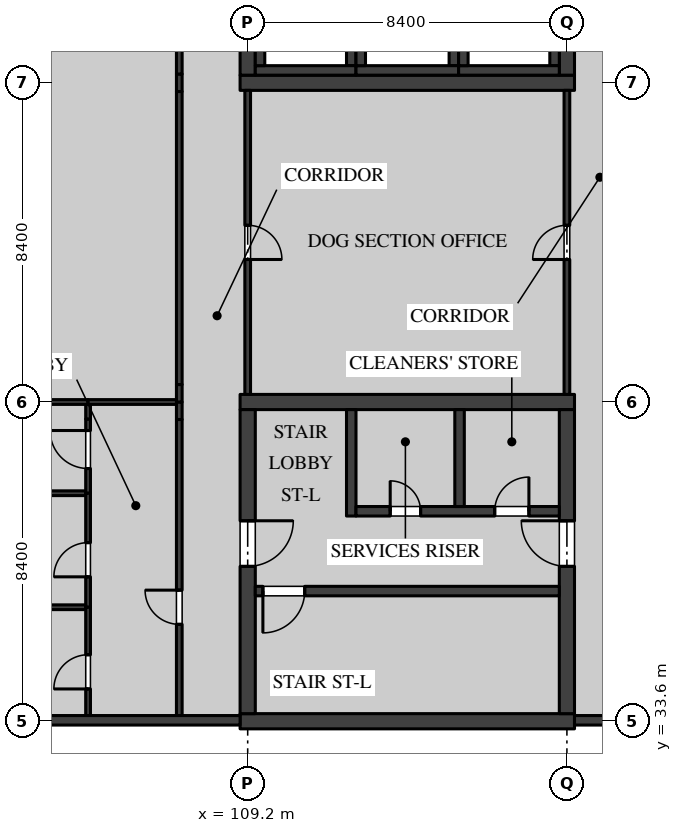
"""IFC4 building model, lengths in metres.
Left out: names, types, materials, properties, quantities, classifications, styles, units other than length and angle.
Written with IfcOpenShell. Run it as: python <this file> out.ifc"""

import sys

from ifc_helpers import new_model, si_unit, direction, frame, frame_2d, origin, place, context, subcontext, project, spatial, rectangle, extrude, element, fill, save


model = new_model("IFC4")
c1 = context("Model", 3, precision=1e-05, world=origin(), true_north=direction((0.0, 1.0)))
c2 = subcontext(c1, "Body", "Model", "MODEL_VIEW")
j1 = project(units=[si_unit("LENGTHUNIT", "METRE"), si_unit("PLANEANGLEUNIT", "RADIAN")], contexts=[c1])
p1 = place(None, origin())
s1 = spatial("IfcSite", under=j1, at=p1, CompositionType="ELEMENT")
p2 = place(p1, origin())
s2 = spatial("IfcBuilding", under=s1, at=p2, CompositionType="ELEMENT")
p3 = place(p2, frame((0.0, 0.0, 9.9)))
s3 = spatial("IfcBuildingStorey", under=s2, at=p3, CompositionType="ELEMENT", Elevation=9.9)
p4 = place(p3, frame((109.0, 50.4, 0.0), z_axis=(0.0, 0.0, 1.0), x_axis=(1.0, 0.0, 0.0)))
e1 = element("IfcWall", 1, at=p4, inside=s3, PredefinedType="SHEAR", context=c2, shape_type="SweptSolid", body=[
    extrude(rectangle(XDim=8.8, YDim=0.4, at=frame_2d((4.4, 0.0))), origin(), (0.0, 0.0, 1.0), 4.37),
])
p5 = place(p3, frame((109.2, 50.6, 0.0), z_axis=(0.0, 0.0, 1.0), x_axis=(0.0, 1.0, 0.0)))
e2 = element("IfcWall", 2, at=p5, inside=s3, PredefinedType="SHEAR", context=c2, shape_type="SweptSolid", body=[
    extrude(rectangle(XDim=8.0, YDim=0.4, at=frame_2d((4.0, 0.0))), origin(), (0.0, 0.0, 1.0), 4.37),
])
p6 = place(p5, frame((3.25, 0.0, 0.0)))
e3 = element("IfcOpeningElement", 3, at=p6, cuts=e2, PredefinedType="OPENING", context=c2, shape_type="SweptSolid", body=[
    extrude(rectangle(XDim=1.2, YDim=2.1, at=frame_2d((0.6, 1.05))), frame((0.0, 0.21, 0.0), z_axis=(0.0, -1.0, 0.0), x_axis=(1.0, 0.0, 0.0)), (0.0, 0.0, 1.0), 0.42),
])
p7 = place(p3, frame((117.6, 50.6, 0.0), z_axis=(0.0, 0.0, 1.0), x_axis=(0.0, 1.0, 0.0)))
e4 = element("IfcWall", 4, at=p7, inside=s3, PredefinedType="SHEAR", context=c2, shape_type="SweptSolid", body=[
    extrude(rectangle(XDim=8.0, YDim=0.4, at=frame_2d((4.0, 0.0))), origin(), (0.0, 0.0, 1.0), 4.37),
])
p8 = place(p7, frame((3.25, 0.0, 0.0)))
e5 = element("IfcOpeningElement", 5, at=p8, cuts=e4, PredefinedType="OPENING", context=c2, shape_type="SweptSolid", body=[
    extrude(rectangle(XDim=1.2, YDim=2.1, at=frame_2d((0.6, 1.05))), frame((0.0, 0.21, 0.0), z_axis=(0.0, -1.0, 0.0), x_axis=(1.0, 0.0, 0.0)), (0.0, 0.0, 1.0), 0.42),
])
p9 = place(p7, frame((6.0, 0.0, 0.0)))
e6 = element("IfcOpeningElement", 6, at=p9, cuts=e4, PredefinedType="OPENING", context=c2, shape_type="SweptSolid", body=[
    extrude(rectangle(XDim=1.2, YDim=2.1, at=frame_2d((0.6, 1.05))), frame((0.0, 0.21, 0.0), z_axis=(0.0, -1.0, 0.0), x_axis=(1.0, 0.0, 0.0)), (0.0, 0.0, 1.0), 0.42),
])
for number, where, z_axis, x_axis in (
    (7, (109.0, 33.6, 0.0), (0.0, 0.0, 1.0), (1.0, 0.0, 0.0)),
    (8, (109.0, 42.0, 0.0), (0.0, 0.0, 1.0), (1.0, 0.0, 0.0)),
):
    element("IfcWall", number, at=place(p3, frame(where, z_axis=z_axis, x_axis=x_axis)), inside=s3, PredefinedType="SHEAR", context=c2, shape_type="SweptSolid", body=[
        extrude(rectangle(XDim=8.8, YDim=0.4, at=frame_2d((4.4, 0.0))), origin(), (0.0, 0.0, 1.0), 4.37),
    ])
p10 = place(p3, frame((109.2, 33.8, 0.0), z_axis=(0.0, 0.0, 1.0), x_axis=(0.0, 1.0, 0.0)))
e9 = element("IfcWall", 9, at=p10, inside=s3, PredefinedType="SHEAR", context=c2, shape_type="SweptSolid", body=[
    extrude(rectangle(XDim=8.0, YDim=0.4, at=frame_2d((4.0, 0.0))), origin(), (0.0, 0.0, 1.0), 4.37),
])
p11 = place(p10, frame((3.875, 0.0, 0.0)))
e10 = element("IfcOpeningElement", 10, at=p11, cuts=e9, PredefinedType="OPENING", context=c2, shape_type="SweptSolid", body=[
    extrude(rectangle(XDim=1.2, YDim=2.1, at=frame_2d((0.6, 1.05))), frame((0.0, 0.21, 0.0), z_axis=(0.0, -1.0, 0.0), x_axis=(1.0, 0.0, 0.0)), (0.0, 0.0, 1.0), 0.42),
])
p12 = place(p3, frame((117.6, 33.8, 0.0), z_axis=(0.0, 0.0, 1.0), x_axis=(0.0, 1.0, 0.0)))
e11 = element("IfcWall", 11, at=p12, inside=s3, PredefinedType="SHEAR", context=c2, shape_type="SweptSolid", body=[
    extrude(rectangle(XDim=8.0, YDim=0.4, at=frame_2d((4.0, 0.0))), origin(), (0.0, 0.0, 1.0), 4.37),
])
p13 = place(p12, frame((3.875, 0.0, 0.0)))
e12 = element("IfcOpeningElement", 12, at=p13, cuts=e11, PredefinedType="OPENING", context=c2, shape_type="SweptSolid", body=[
    extrude(rectangle(XDim=1.2, YDim=2.1, at=frame_2d((0.6, 1.05))), frame((0.0, 0.21, 0.0), z_axis=(0.0, -1.0, 0.0), x_axis=(1.0, 0.0, 0.0)), (0.0, 0.0, 1.0), 0.42),
])
p14 = place(p3, frame((109.4, 37.025, 0.0), z_axis=(0.0, 0.0, 1.0), x_axis=(1.0, 0.0, 0.0)))
e13 = element("IfcWall", 13, at=p14, inside=s3, PredefinedType="SOLIDWALL", context=c2, shape_type="SweptSolid", body=[
    extrude(rectangle(XDim=8.0, YDim=0.25, at=frame_2d((4.0, 0.0))), origin(), (0.0, 0.0, 1.0), 4.37),
])
p15 = place(p14, frame((0.2, 0.0, 0.0)))
e14 = element("IfcOpeningElement", 14, at=p15, cuts=e13, PredefinedType="OPENING", context=c2, shape_type="SweptSolid", body=[
    extrude(rectangle(XDim=1.1, YDim=2.1, at=frame_2d((0.55, 1.05))), frame((0.0, 0.135, 0.0), z_axis=(0.0, -1.0, 0.0), x_axis=(1.0, 0.0, 0.0)), (0.0, 0.0, 1.0), 0.27),
])
p16 = place(p3, frame((111.925, 39.0, 0.0), z_axis=(0.0, 0.0, 1.0), x_axis=(0.0, 1.0, 0.0)))
e15 = element("IfcWall", 15, at=p16, inside=s3, PredefinedType="SOLIDWALL", context=c2, shape_type="SweptSolid", body=[
    extrude(rectangle(XDim=2.8, YDim=0.25, at=frame_2d((1.4, 0.0))), origin(), (0.0, 0.0, 1.0), 4.37),
])
p17 = place(p3, frame((112.05, 39.125, 0.0), z_axis=(0.0, 0.0, 1.0), x_axis=(1.0, 0.0, 0.0)))
e16 = element("IfcWall", 16, at=p17, inside=s3, PredefinedType="SOLIDWALL", context=c2, shape_type="SweptSolid", body=[
    extrude(rectangle(XDim=5.35, YDim=0.25, at=frame_2d((2.675, 0.0))), origin(), (0.0, 0.0, 1.0), 4.37),
])
p18 = place(p17, frame((3.65, 0.0, 0.0)))
e17 = element("IfcOpeningElement", 17, at=p18, cuts=e16, PredefinedType="OPENING", context=c2, shape_type="SweptSolid", body=[
    extrude(rectangle(XDim=0.9, YDim=2.1, at=frame_2d((0.45, 1.05))), frame((0.0, 0.135, 0.0), z_axis=(0.0, -1.0, 0.0), x_axis=(1.0, 0.0, 0.0)), (0.0, 0.0, 1.0), 0.27),
])
p19 = place(p17, frame((0.9, 0.0, 0.0)))
e18 = element("IfcOpeningElement", 18, at=p19, cuts=e16, PredefinedType="OPENING", context=c2, shape_type="SweptSolid", body=[
    extrude(rectangle(XDim=0.8, YDim=2.1, at=frame_2d((0.4, 1.05))), frame((0.0, 0.135, 0.0), z_axis=(0.0, -1.0, 0.0), x_axis=(1.0, 0.0, 0.0)), (0.0, 0.0, 1.0), 0.27),
])
p20 = place(p3, frame((114.775, 39.25, 0.0), z_axis=(0.0, 0.0, 1.0), x_axis=(0.0, 1.0, 0.0)))
e19 = element("IfcWall", 19, at=p20, inside=s3, PredefinedType="SOLIDWALL", context=c2, shape_type="SweptSolid", body=[
    extrude(rectangle(XDim=2.55, YDim=0.25, at=frame_2d((1.275, 0.0))), origin(), (0.0, 0.0, 1.0), 4.37),
])
p21 = place(p3, frame((111.925, 50.85, 0.0), z_axis=(0.0, 0.0, 1.0), x_axis=(0.0, 1.0, 0.0)))
e20 = element("IfcWall", 20, at=p21, inside=s3, PredefinedType="SOLIDWALL", context=c2, shape_type="SweptSolid", body=[
    extrude(rectangle(XDim=2.3, YDim=0.25, at=frame_2d((1.15, 0.0))), origin(), (0.0, 0.0, 1.0), 4.37),
])
p22 = place(p3, frame((109.4, 50.725, 0.0), z_axis=(0.0, 0.0, 1.0), x_axis=(1.0, 0.0, 0.0)))
e21 = element("IfcWall", 21, at=p22, inside=s3, PredefinedType="SOLIDWALL", context=c2, shape_type="SweptSolid", body=[
    extrude(rectangle(XDim=2.65, YDim=0.25, at=frame_2d((1.325, 0.0))), origin(), (0.0, 0.0, 1.0), 4.37),
])
for number, where, z_axis, x_axis in (
    (22, (109.525, 50.85, 0.0), (0.0, 0.0, 1.0), (0.0, 1.0, 0.0)),
    (23, (114.625, 50.85, 0.0), (0.0, 0.0, 1.0), (0.0, 1.0, 0.0)),
):
    element("IfcWall", number, at=place(p3, frame(where, z_axis=z_axis, x_axis=x_axis)), inside=s3, PredefinedType="SOLIDWALL", context=c2, shape_type="SweptSolid", body=[
        extrude(rectangle(XDim=2.3, YDim=0.25, at=frame_2d((1.15, 0.0))), origin(), (0.0, 0.0, 1.0), 4.37),
    ])
p23 = place(p3, frame((112.05, 50.725, 0.0), z_axis=(0.0, 0.0, 1.0), x_axis=(1.0, 0.0, 0.0)))
e24 = element("IfcWall", 24, at=p23, inside=s3, PredefinedType="SOLIDWALL", context=c2, shape_type="SweptSolid", body=[
    extrude(rectangle(XDim=2.7, YDim=0.25, at=frame_2d((1.35, 0.0))), origin(), (0.0, 0.0, 1.0), 4.37),
])
for number, where, z_axis, x_axis in (
    (25, (112.175, 50.85, 0.0), (0.0, 0.0, 1.0), (0.0, 1.0, 0.0)),
    (26, (117.275, 50.85, 0.0), (0.0, 0.0, 1.0), (0.0, 1.0, 0.0)),
):
    element("IfcWall", number, at=place(p3, frame(where, z_axis=z_axis, x_axis=x_axis)), inside=s3, PredefinedType="SOLIDWALL", context=c2, shape_type="SweptSolid", body=[
        extrude(rectangle(XDim=2.3, YDim=0.25, at=frame_2d((1.15, 0.0))), origin(), (0.0, 0.0, 1.0), 4.37),
    ])
p24 = place(p3, frame((114.75, 50.725, 0.0), z_axis=(0.0, 0.0, 1.0), x_axis=(1.0, 0.0, 0.0)))
e27 = element("IfcWall", 27, at=p24, inside=s3, PredefinedType="SOLIDWALL", context=c2, shape_type="SweptSolid", body=[
    extrude(rectangle(XDim=2.65, YDim=0.25, at=frame_2d((1.325, 0.0))), origin(), (0.0, 0.0, 1.0), 4.37),
])
p25 = place(p3, frame((114.875, 50.85, 0.0), z_axis=(0.0, 0.0, 1.0), x_axis=(0.0, 1.0, 0.0)))
e28 = element("IfcWall", 28, at=p25, inside=s3, PredefinedType="SOLIDWALL", context=c2, shape_type="SweptSolid", body=[
    extrude(rectangle(XDim=2.3, YDim=0.25, at=frame_2d((1.15, 0.0))), origin(), (0.0, 0.0, 1.0), 4.37),
])
p26 = place(p3, frame((117.6, 42.2, 0.0), z_axis=(0.0, 0.0, 1.0), x_axis=(0.0, 1.0, 0.0)))
e29 = element("IfcWall", 29, at=p26, inside=s3, PredefinedType="PARTITIONING", context=c2, shape_type="SweptSolid", body=[
    extrude(rectangle(XDim=8.0, YDim=0.15, at=frame_2d((4.0, 0.0))), origin(), (0.0, 0.0, 1.0), 3.746),
])
p27 = place(p26, frame((3.55, 0.0, 0.0)))
e30 = element("IfcOpeningElement", 30, at=p27, cuts=e29, PredefinedType="OPENING", context=c2, shape_type="SweptSolid", body=[
    extrude(rectangle(XDim=0.9, YDim=2.1, at=frame_2d((0.45, 1.05))), frame((0.0, 0.085, 0.0), z_axis=(0.0, -1.0, 0.0), x_axis=(1.0, 0.0, 0.0)), (0.0, 0.0, 1.0), 0.17),
])
p28 = place(p3, frame((109.2, 42.2, 0.0), z_axis=(0.0, 0.0, 1.0), x_axis=(0.0, 1.0, 0.0)))
e31 = element("IfcWall", 31, at=p28, inside=s3, PredefinedType="PARTITIONING", context=c2, shape_type="SweptSolid", body=[
    extrude(rectangle(XDim=8.0, YDim=0.15, at=frame_2d((4.0, 0.0))), origin(), (0.0, 0.0, 1.0), 3.746),
])
p29 = place(p28, frame((3.55, 0.0, 0.0)))
e32 = element("IfcOpeningElement", 32, at=p29, cuts=e31, PredefinedType="OPENING", context=c2, shape_type="SweptSolid", body=[
    extrude(rectangle(XDim=0.9, YDim=2.1, at=frame_2d((0.45, 1.05))), frame((0.0, 0.085, 0.0), z_axis=(0.0, -1.0, 0.0), x_axis=(1.0, 0.0, 0.0)), (0.0, 0.0, 1.0), 0.17),
])
p30 = place(p3, frame((107.4, 33.75, 0.0), z_axis=(0.0, 0.0, 1.0), x_axis=(0.0, 1.0, 0.0)))
e33 = element("IfcWall", 33, at=p30, inside=s3, PredefinedType="PARTITIONING", context=c2, shape_type="SweptSolid", body=[
    extrude(rectangle(XDim=7.79, YDim=0.15, at=frame_2d((3.895, 0.0))), origin(), (0.0, 0.0, 1.0), 4.37),
])
p31 = place(p30, frame((2.4, 0.0, 0.0)))
e34 = element("IfcOpeningElement", 34, at=p31, cuts=e33, PredefinedType="OPENING", context=c2, shape_type="SweptSolid", body=[
    extrude(rectangle(XDim=0.9, YDim=2.1, at=frame_2d((0.45, 1.05))), frame((0.0, 0.085, 0.0), z_axis=(0.0, -1.0, 0.0), x_axis=(1.0, 0.0, 0.0)), (0.0, 0.0, 1.0), 0.17),
])
for number, where, z_axis, x_axis in (
    (35, (107.4, 41.54, 0.0), (0.0, 0.0, 1.0), (0.0, 1.0, 0.0)),
    (36, (107.4, 42.0, 0.0), (0.0, 0.0, 1.0), (0.0, 1.0, 0.0)),
):
    element("IfcWall", number, at=place(p3, frame(where, z_axis=z_axis, x_axis=x_axis)), inside=s3, PredefinedType="PARTITIONING", context=c2, shape_type="SweptSolid", body=[
        extrude(rectangle(XDim=0.46, YDim=0.15, at=frame_2d((0.23, 0.0))), origin(), (0.0, 0.0, 1.0), 3.746),
    ])
p32 = place(p3, frame((107.4, 42.46, 0.0), z_axis=(0.0, 0.0, 1.0), x_axis=(0.0, 1.0, 0.0)))
e37 = element("IfcWall", 37, at=p32, inside=s3, PredefinedType="PARTITIONING", context=c2, shape_type="SweptSolid", body=[
    extrude(rectangle(XDim=7.71, YDim=0.15, at=frame_2d((3.855, 0.0))), origin(), (0.0, 0.0, 1.0), 4.37),
])
p33 = place(p3, frame((107.4, 50.17, 0.0), z_axis=(0.0, 0.0, 1.0), x_axis=(0.0, 1.0, 0.0)))
e38 = element("IfcWall", 38, at=p33, inside=s3, PredefinedType="PARTITIONING", context=c2, shape_type="SweptSolid", body=[
    extrude(rectangle(XDim=0.46, YDim=0.15, at=frame_2d((0.23, 0.0))), origin(), (0.0, 0.0, 1.0), 3.746),
])
p34 = place(p3, frame((107.4, 50.63, 0.0), z_axis=(0.0, 0.0, 1.0), x_axis=(0.0, 1.0, 0.0)))
e39 = element("IfcWall", 39, at=p34, inside=s3, PredefinedType="PARTITIONING", context=c2, shape_type="SweptSolid", body=[
    extrude(rectangle(XDim=7.94, YDim=0.15, at=frame_2d((3.97, 0.0))), origin(), (0.0, 0.0, 1.0), 4.37),
])
p35 = place(p34, frame((3.02, 0.0, 0.0)))
e40 = element("IfcOpeningElement", 40, at=p35, cuts=e39, PredefinedType="OPENING", context=c2, shape_type="SweptSolid", body=[
    extrude(rectangle(XDim=1.35, YDim=2.1, at=frame_2d((0.675, 1.05))), frame((0.0, 0.085, 0.0), z_axis=(0.0, -1.0, 0.0), x_axis=(1.0, 0.0, 0.0)), (0.0, 0.0, 1.0), 0.17),
])
p36 = place(p3, frame((103.407, 39.6, 0.0), z_axis=(0.0, 0.0, 1.0), x_axis=(1.0, 0.0, 0.0)))
e41 = element("IfcWall", 41, at=p36, inside=s3, PredefinedType="PARTITIONING", context=c2, shape_type="SweptSolid", body=[
    extrude(rectangle(XDim=1.531, YDim=0.125, at=frame_2d((0.766, 0.0))), origin(), (0.0, 0.0, 1.0), 3.895),
])
p37 = place(p3, frame((105.0, 39.6, 0.0), z_axis=(0.0, 0.0, 1.0), x_axis=(0.0, 1.0, 0.0)))
e42 = element("IfcWall", 42, at=p37, inside=s3, PredefinedType="PARTITIONING", context=c2, shape_type="SweptSolid", body=[
    extrude(rectangle(XDim=1.953, YDim=0.125, at=frame_2d((0.977, 0.0))), origin(), (0.0, 0.0, 1.0), 4.37),
])
p38 = place(p37, frame((0.65, 0.0, 0.0)))
e43 = element("IfcOpeningElement", 43, at=p38, cuts=e42, PredefinedType="OPENING", context=c2, shape_type="SweptSolid", body=[
    extrude(rectangle(XDim=1.0, YDim=2.1, at=frame_2d((0.5, 1.05))), frame((0.0, 0.073, 0.0), z_axis=(0.0, -1.0, 0.0), x_axis=(1.0, 0.0, 0.0)), (0.0, 0.0, 1.0), 0.145),
])
p39 = place(p3, frame((105.0, 41.553, 0.0), z_axis=(0.0, 0.0, 1.0), x_axis=(0.0, 1.0, 0.0)))
e44 = element("IfcWall", 44, at=p39, inside=s3, PredefinedType="PARTITIONING", context=c2, shape_type="SweptSolid", body=[
    extrude(rectangle(XDim=0.385, YDim=0.125, at=frame_2d((0.192, 0.0))), origin(), (0.0, 0.0, 1.0), 3.746),
])
p40 = place(p3, frame((100.999, 42.0, 0.0), z_axis=(0.0, 0.0, 1.0), x_axis=(1.0, 0.0, 0.0)))
e45 = element("IfcWall", 45, at=p40, inside=s3, PredefinedType="PARTITIONING", context=c2, shape_type="SweptSolid", body=[
    extrude(rectangle(XDim=4.001, YDim=0.125, at=frame_2d((2.0, 0.0))), origin(), (0.0, 0.0, 1.0), 3.746),
])
p41 = place(p3, frame((105.0, 36.6, 0.0), z_axis=(0.0, 0.0, 1.0), x_axis=(0.0, 1.0, 0.0)))
e46 = element("IfcWall", 46, at=p41, inside=s3, PredefinedType="PARTITIONING", context=c2, shape_type="SweptSolid", body=[
    extrude(rectangle(XDim=3.0, YDim=0.125, at=frame_2d((1.5, 0.0))), origin(), (0.0, 0.0, 1.0), 4.37),
])
p42 = place(p41, frame((0.8, 0.0, 0.0)))
e47 = element("IfcOpeningElement", 47, at=p42, cuts=e46, PredefinedType="OPENING", context=c2, shape_type="SweptSolid", body=[
    extrude(rectangle(XDim=0.9, YDim=2.1, at=frame_2d((0.45, 1.05))), frame((0.0, 0.073, 0.0), z_axis=(0.0, -1.0, 0.0), x_axis=(1.0, 0.0, 0.0)), (0.0, 0.0, 1.0), 0.145),
])
p43 = place(p3, frame((103.407, 36.6, 0.0), z_axis=(0.0, 0.0, 1.0), x_axis=(1.0, 0.0, 0.0)))
e48 = element("IfcWall", 48, at=p43, inside=s3, PredefinedType="PARTITIONING", context=c2, shape_type="SweptSolid", body=[
    extrude(rectangle(XDim=1.531, YDim=0.125, at=frame_2d((0.766, 0.0))), origin(), (0.0, 0.0, 1.0), 3.895),
])
p44 = place(p3, frame((105.0, 33.75, 0.0), z_axis=(0.0, 0.0, 1.0), x_axis=(0.0, 1.0, 0.0)))
e49 = element("IfcWall", 49, at=p44, inside=s3, PredefinedType="PARTITIONING", context=c2, shape_type="SweptSolid", body=[
    extrude(rectangle(XDim=2.85, YDim=0.125, at=frame_2d((1.425, 0.0))), origin(), (0.0, 0.0, 1.0), 4.37),
])
p45 = place(p44, frame((0.7, 0.0, 0.0)))
e50 = element("IfcOpeningElement", 50, at=p45, cuts=e49, PredefinedType="OPENING", context=c2, shape_type="SweptSolid", body=[
    extrude(rectangle(XDim=0.9, YDim=2.1, at=frame_2d((0.45, 1.05))), frame((0.0, 0.073, 0.0), z_axis=(0.0, -1.0, 0.0), x_axis=(1.0, 0.0, 0.0)), (0.0, 0.0, 1.0), 0.145),
])
p46 = place(p3, frame((105.0, 42.0, 0.0), z_axis=(0.0, 0.0, 1.0), x_axis=(1.0, 0.0, 0.0)))
e51 = element("IfcWall", 51, at=p46, inside=s3, PredefinedType="PARTITIONING", context=c2, shape_type="SweptSolid", body=[
    extrude(rectangle(XDim=2.325, YDim=0.125, at=frame_2d((1.163, 0.0))), origin(), (0.0, 0.0, 1.0), 3.746),
])
p47 = place(p3, frame((100.802, 33.625, 0.0), z_axis=(0.0, 0.0, 1.0), x_axis=(1.0, 0.0, 0.0)))
e52 = element("IfcWall", 52, at=p47, inside=s3, PredefinedType="SOLIDWALL", context=c2, shape_type="SweptSolid", body=[
    extrude(rectangle(XDim=8.198, YDim=0.25, at=frame_2d((4.099, 0.0))), origin(), (0.0, 0.0, 1.0), 3.746),
])
p48 = place(p47, frame((1.649, 0.0, 1.5)))
e53 = element("IfcOpeningElement", 53, at=p48, cuts=e52, PredefinedType="OPENING", context=c2, shape_type="SweptSolid", body=[
    extrude(rectangle(XDim=0.9, YDim=1.2, at=frame_2d((0.45, 0.6))), frame((0.0, 0.135, 0.0), z_axis=(0.0, -1.0, 0.0), x_axis=(1.0, 0.0, 0.0)), (0.0, 0.0, 1.0), 0.27),
])
p49 = place(p3, frame((117.8, 33.625, 0.0), z_axis=(0.0, 0.0, 1.0), x_axis=(1.0, 0.0, 0.0)))
e54 = element("IfcWall", 54, at=p49, inside=s3, PredefinedType="SOLIDWALL", context=c2, shape_type="SweptSolid", body=[
    extrude(rectangle(XDim=8.194, YDim=0.25, at=frame_2d((4.097, 0.0))), origin(), (0.0, 0.0, 1.0), 3.746),
])
p50 = place(p49, frame((5.2, 0.0, 0.9)))
e55 = element("IfcOpeningElement", 55, at=p50, cuts=e54, PredefinedType="OPENING", context=c2, shape_type="SweptSolid", body=[
    extrude(rectangle(XDim=1.8, YDim=2.1, at=frame_2d((0.9, 1.05))), frame((0.0, 0.135, 0.0), z_axis=(0.0, -1.0, 0.0), x_axis=(1.0, 0.0, 0.0)), (0.0, 0.0, 1.0), 0.27),
])
p51 = place(p18, origin())
e56 = element("IfcDoor", 56, at=p51, inside=s3, OperationType="SINGLE_SWING_LEFT", PredefinedType="DOOR", context=c2, shape_type="SweptSolid", body=[
    extrude(rectangle(XDim=0.9, YDim=2.1, at=frame_2d((0.45, 1.05))), frame((0.0, 0.035, 0.0), z_axis=(0.0, -1.0, 0.0), x_axis=(1.0, 0.0, 0.0)), (0.0, 0.0, 1.0), 0.07),
])
fill(e17, e56)
p52 = place(p11, frame((1.2, 0.0, 0.0), z_axis=(0.0, 0.0, 1.0), x_axis=(-1.0, 0.0, 0.0)))
e57 = element("IfcDoor", 57, at=p52, inside=s3, OperationType="SINGLE_SWING_RIGHT", PredefinedType="DOOR", context=c2, shape_type="SweptSolid", body=[
    extrude(rectangle(XDim=1.2, YDim=2.1, at=frame_2d((0.6, 1.05))), frame((0.0, 0.035, 0.0), z_axis=(0.0, -1.0, 0.0), x_axis=(1.0, 0.0, 0.0)), (0.0, 0.0, 1.0), 0.07),
])
fill(e10, e57)
p53 = place(p13, origin())
e58 = element("IfcDoor", 58, at=p53, inside=s3, OperationType="SINGLE_SWING_LEFT", PredefinedType="DOOR", context=c2, shape_type="SweptSolid", body=[
    extrude(rectangle(XDim=1.2, YDim=2.1, at=frame_2d((0.6, 1.05))), frame((0.0, 0.035, 0.0), z_axis=(0.0, -1.0, 0.0), x_axis=(1.0, 0.0, 0.0)), (0.0, 0.0, 1.0), 0.07),
])
fill(e12, e58)
p54 = place(p19, origin())
e59 = element("IfcDoor", 59, at=p54, inside=s3, OperationType="SINGLE_SWING_RIGHT", PredefinedType="DOOR", context=c2, shape_type="SweptSolid", body=[
    extrude(rectangle(XDim=0.8, YDim=2.1, at=frame_2d((0.4, 1.05))), frame((0.0, 0.035, 0.0), z_axis=(0.0, -1.0, 0.0), x_axis=(1.0, 0.0, 0.0)), (0.0, 0.0, 1.0), 0.07),
])
fill(e18, e59)
p55 = place(p15, frame((1.1, 0.0, 0.0), z_axis=(0.0, 0.0, 1.0), x_axis=(-1.0, 0.0, 0.0)))
e60 = element("IfcDoor", 60, at=p55, inside=s3, OperationType="SINGLE_SWING_LEFT", PredefinedType="DOOR", context=c2, shape_type="SweptSolid", body=[
    extrude(rectangle(XDim=1.1, YDim=2.1, at=frame_2d((0.55, 1.05))), frame((0.0, 0.035, 0.0), z_axis=(0.0, -1.0, 0.0), x_axis=(1.0, 0.0, 0.0)), (0.0, 0.0, 1.0), 0.07),
])
fill(e14, e60)
p56 = place(p27, origin())
e61 = element("IfcDoor", 61, at=p56, inside=s3, OperationType="SINGLE_SWING_RIGHT", PredefinedType="DOOR", context=c2, shape_type="SweptSolid", body=[
    extrude(rectangle(XDim=0.9, YDim=2.1, at=frame_2d((0.45, 1.05))), frame((0.0, 0.025, 0.0), z_axis=(0.0, -1.0, 0.0), x_axis=(1.0, 0.0, 0.0)), (0.0, 0.0, 1.0), 0.05),
])
fill(e30, e61)
p57 = place(p29, frame((0.9, 0.0, 0.0), z_axis=(0.0, 0.0, 1.0), x_axis=(-1.0, 0.0, 0.0)))
e62 = element("IfcDoor", 62, at=p57, inside=s3, OperationType="SINGLE_SWING_LEFT", PredefinedType="DOOR", context=c2, shape_type="SweptSolid", body=[
    extrude(rectangle(XDim=0.9, YDim=2.1, at=frame_2d((0.45, 1.05))), frame((0.0, 0.025, 0.0), z_axis=(0.0, -1.0, 0.0), x_axis=(1.0, 0.0, 0.0)), (0.0, 0.0, 1.0), 0.05),
])
fill(e32, e62)
p58 = place(p38, origin())
e63 = element("IfcDoor", 63, at=p58, inside=s3, OperationType="SINGLE_SWING_LEFT", PredefinedType="DOOR", context=c2, shape_type="SweptSolid", body=[
    extrude(rectangle(XDim=1.0, YDim=2.1, at=frame_2d((0.5, 1.05))), frame((0.0, 0.02, 0.0), z_axis=(0.0, -1.0, 0.0), x_axis=(1.0, 0.0, 0.0)), (0.0, 0.0, 1.0), 0.04),
])
fill(e43, e63)
p59 = place(p42, origin())
e64 = element("IfcDoor", 64, at=p59, inside=s3, OperationType="SINGLE_SWING_RIGHT", PredefinedType="DOOR", context=c2, shape_type="SweptSolid", body=[
    extrude(rectangle(XDim=0.9, YDim=2.1, at=frame_2d((0.45, 1.05))), frame((0.0, 0.02, 0.0), z_axis=(0.0, -1.0, 0.0), x_axis=(1.0, 0.0, 0.0)), (0.0, 0.0, 1.0), 0.04),
])
fill(e47, e64)
p60 = place(p31, origin())
e65 = element("IfcDoor", 65, at=p60, inside=s3, OperationType="SINGLE_SWING_LEFT", PredefinedType="DOOR", context=c2, shape_type="SweptSolid", body=[
    extrude(rectangle(XDim=0.9, YDim=2.1, at=frame_2d((0.45, 1.05))), frame((0.0, 0.025, 0.0), z_axis=(0.0, -1.0, 0.0), x_axis=(1.0, 0.0, 0.0)), (0.0, 0.0, 1.0), 0.05),
])
fill(e34, e65)
p61 = place(p45, origin())
e66 = element("IfcDoor", 66, at=p61, inside=s3, OperationType="SINGLE_SWING_RIGHT", PredefinedType="DOOR", context=c2, shape_type="SweptSolid", body=[
    extrude(rectangle(XDim=0.9, YDim=2.1, at=frame_2d((0.45, 1.05))), frame((0.0, 0.02, 0.0), z_axis=(0.0, -1.0, 0.0), x_axis=(1.0, 0.0, 0.0)), (0.0, 0.0, 1.0), 0.04),
])
fill(e50, e66)
save(model, sys.argv[1])
